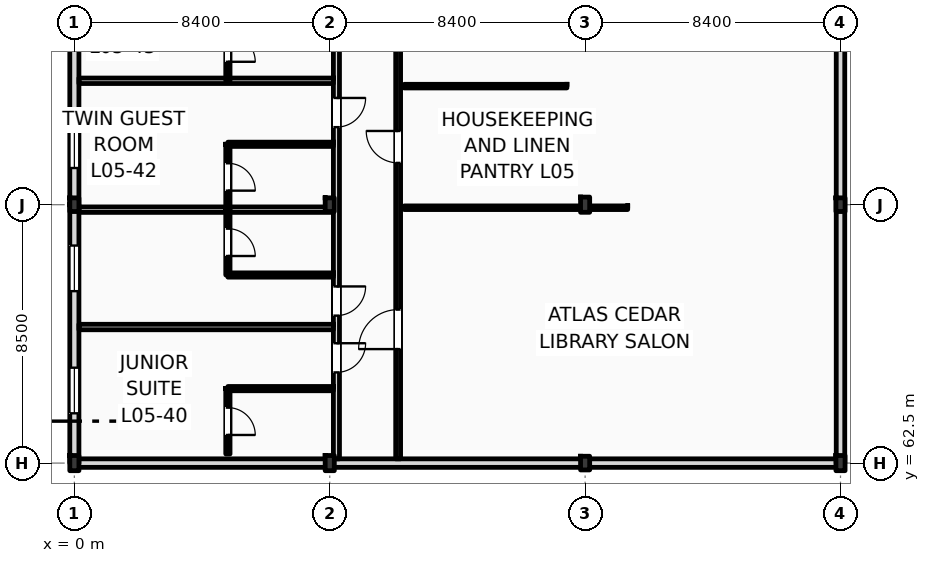
"""IFC4 building model, lengths in metres.
Left out: names, types, materials, properties, quantities, classifications, styles, units other than length and angle.
Written with IfcOpenShell. Run it as: python <this file> out.ifc"""

import sys

from ifc_helpers import new_model, si_unit, direction, frame, frame_2d, origin, origin_2d, place, context, subcontext, project, spatial, rectangle, i_section, extrude, element, fill, save


model = new_model("IFC4")
c1 = context("Model", 3, precision=1e-05, world=origin(), true_north=direction((0.0, 1.0)))
c2 = subcontext(c1, "Body", "Model", "MODEL_VIEW")
j1 = project(units=[si_unit("LENGTHUNIT", "METRE"), si_unit("PLANEANGLEUNIT", "RADIAN")], contexts=[c1])
p1 = place(None, origin())
s1 = spatial("IfcSite", under=j1, at=p1, CompositionType="ELEMENT")
p2 = place(p1, origin())
s2 = spatial("IfcBuilding", under=s1, at=p2, CompositionType="ELEMENT")
p3 = place(p2, frame((0.0, 0.0, 24.6)))
s3 = spatial("IfcBuildingStorey", under=s2, at=p3, CompositionType="ELEMENT", Elevation=24.6)
p4 = place(p3, frame((0.0, 62.5, 0.0), z_axis=(0.0, 0.0, 1.0), x_axis=(1.0, 0.0, 0.0)))
e1 = element("IfcColumn", 1, at=p4, inside=s3, PredefinedType="COLUMN", context=c2, shape_type="SweptSolid", body=[
    extrude(i_section(OverallWidth=0.3, OverallDepth=0.5, WebThickness=0.014, FlangeThickness=0.028, FilletRadius=0.027, at=origin_2d()), origin(), (0.0, 0.0, 1.0), 3.6),
])
p5 = place(p3, frame((0.0, 71.0, 0.0), z_axis=(0.0, 0.0, 1.0), x_axis=(1.0, 0.0, 0.0)))
e2 = element("IfcColumn", 2, at=p5, inside=s3, PredefinedType="COLUMN", context=c2, shape_type="SweptSolid", body=[
    extrude(i_section(OverallWidth=0.3, OverallDepth=0.45, WebThickness=0.014, FlangeThickness=0.026, FilletRadius=0.027, at=origin_2d()), origin(), (0.0, 0.0, 1.0), 3.6),
])
p6 = place(p3, frame((8.4, 62.5, 0.0), z_axis=(0.0, 0.0, 1.0), x_axis=(1.0, 0.0, 0.0)))
e3 = element("IfcColumn", 3, at=p6, inside=s3, PredefinedType="COLUMN", context=c2, shape_type="SweptSolid", body=[
    extrude(i_section(OverallWidth=0.3, OverallDepth=0.5, WebThickness=0.014, FlangeThickness=0.028, FilletRadius=0.027, at=origin_2d()), origin(), (0.0, 0.0, 1.0), 3.6),
])
for number, where, z_axis, x_axis in (
    (4, (8.4, 71.0, 0.0), (0.0, 0.0, 1.0), (1.0, 0.0, 0.0)),
    (5, (16.8, 62.5, 0.0), (0.0, 0.0, 1.0), (1.0, 0.0, 0.0)),
):
    element("IfcColumn", number, at=place(p3, frame(where, z_axis=z_axis, x_axis=x_axis)), inside=s3, PredefinedType="COLUMN", context=c2, shape_type="SweptSolid", body=[
        extrude(i_section(OverallWidth=0.3, OverallDepth=0.45, WebThickness=0.014, FlangeThickness=0.026, FilletRadius=0.027, at=origin_2d()), origin(), (0.0, 0.0, 1.0), 3.6),
    ])
for number, where, z_axis, x_axis in (
    (6, (16.8, 71.0, 0.0), (0.0, 0.0, 1.0), (1.0, 0.0, 0.0)),
    (7, (25.2, 62.5, 0.0), (0.0, 0.0, 1.0), (1.0, 0.0, 0.0)),
):
    element("IfcColumn", number, at=place(p3, frame(where, z_axis=z_axis, x_axis=x_axis)), inside=s3, PredefinedType="COLUMN", context=c2, shape_type="SweptSolid", body=[
        extrude(i_section(OverallWidth=0.3, OverallDepth=0.5, WebThickness=0.014, FlangeThickness=0.028, FilletRadius=0.027, at=origin_2d()), origin(), (0.0, 0.0, 1.0), 3.6),
    ])
p7 = place(p3, frame((25.2, 71.0, 0.0), z_axis=(0.0, 0.0, 1.0), x_axis=(1.0, 0.0, 0.0)))
e8 = element("IfcColumn", 8, at=p7, inside=s3, PredefinedType="COLUMN", context=c2, shape_type="SweptSolid", body=[
    extrude(i_section(OverallWidth=0.3, OverallDepth=0.45, WebThickness=0.014, FlangeThickness=0.026, FilletRadius=0.027, at=origin_2d()), origin(), (0.0, 0.0, 1.0), 3.6),
])
p8 = place(p3, frame((0.0, 62.5, 0.0), z_axis=(0.0, 0.0, 1.0), x_axis=(0.0, 1.0, 0.0)))
e9 = element("IfcWall", 9, at=p8, inside=s3, PredefinedType="STANDARD", context=c2, shape_type="SweptSolid", body=[
    extrude(rectangle(XDim=8.5, YDim=0.3, at=frame_2d((4.25, 0.0))), origin(), (0.0, 0.0, 1.0), 2.93),
])
p9 = place(p8, frame((1.638, 0.0, 0.9)))
e10 = element("IfcOpeningElement", 10, at=p9, cuts=e9, PredefinedType="OPENING", context=c2, shape_type="SweptSolid", body=[
    extrude(rectangle(XDim=1.5, YDim=1.85, at=frame_2d((0.75, 0.925))), frame((0.0, 0.16, 0.0), z_axis=(0.0, -1.0, 0.0), x_axis=(1.0, 0.0, 0.0)), (0.0, 0.0, 1.0), 0.32),
])
p10 = place(p8, frame((5.656, 0.0, 0.9)))
e11 = element("IfcOpeningElement", 11, at=p10, cuts=e9, PredefinedType="OPENING", context=c2, shape_type="SweptSolid", body=[
    extrude(rectangle(XDim=1.5, YDim=1.85, at=frame_2d((0.75, 0.925))), frame((0.0, 0.16, 0.0), z_axis=(0.0, -1.0, 0.0), x_axis=(1.0, 0.0, 0.0)), (0.0, 0.0, 1.0), 0.32),
])
p11 = place(p3, frame((0.0, 71.0, 0.0), z_axis=(0.0, 0.0, 1.0), x_axis=(0.0, 1.0, 0.0)))
e12 = element("IfcWall", 12, at=p11, inside=s3, PredefinedType="STANDARD", context=c2, shape_type="SweptSolid", body=[
    extrude(rectangle(XDim=8.5, YDim=0.3, at=frame_2d((4.25, 0.0))), origin(), (0.0, 0.0, 1.0), 2.93),
])
p12 = place(p11, frame((1.207, 0.0, 0.9)))
e13 = element("IfcOpeningElement", 13, at=p12, cuts=e12, PredefinedType="OPENING", context=c2, shape_type="SweptSolid", body=[
    extrude(rectangle(XDim=1.5, YDim=1.85, at=frame_2d((0.75, 0.925))), frame((0.0, 0.16, 0.0), z_axis=(0.0, -1.0, 0.0), x_axis=(1.0, 0.0, 0.0)), (0.0, 0.0, 1.0), 0.32),
])
p13 = place(p11, frame((5.256, 0.0, 0.9)))
e14 = element("IfcOpeningElement", 14, at=p13, cuts=e12, PredefinedType="OPENING", context=c2, shape_type="SweptSolid", body=[
    extrude(rectangle(XDim=1.5, YDim=1.85, at=frame_2d((0.75, 0.925))), frame((0.0, 0.16, 0.0), z_axis=(0.0, -1.0, 0.0), x_axis=(1.0, 0.0, 0.0)), (0.0, 0.0, 1.0), 0.32),
])
p14 = place(p3, frame((0.0, 62.5, 0.0), z_axis=(0.0, 0.0, 1.0), x_axis=(1.0, 0.0, 0.0)))
e15 = element("IfcWall", 15, at=p14, inside=s3, PredefinedType="STANDARD", context=c2, shape_type="SweptSolid", body=[
    extrude(rectangle(XDim=25.2, YDim=0.28, at=frame_2d((12.6, 0.0))), origin(), (0.0, 0.0, 1.0), 2.78),
])
p15 = place(p3, frame((25.2, 62.5, 0.0), z_axis=(0.0, 0.0, 1.0), x_axis=(0.0, 1.0, 0.0)))
e16 = element("IfcWall", 16, at=p15, inside=s3, PredefinedType="STANDARD", context=c2, shape_type="SweptSolid", body=[
    extrude(rectangle(XDim=17.0, YDim=0.28, at=frame_2d((8.5, 0.0))), origin(), (0.0, 0.0, 1.0), 2.93),
])
p16 = place(p3, frame((8.62, 62.64, 0.0), z_axis=(0.0, 0.0, 1.0), x_axis=(0.0, 1.0, 0.0)))
e17 = element("IfcWall", 17, at=p16, inside=s3, PredefinedType="PARTITIONING", context=c2, shape_type="SweptSolid", body=[
    extrude(rectangle(XDim=32.66, YDim=0.2, at=frame_2d((16.33, 0.0))), origin(), (0.0, 0.0, 1.0), 2.93),
])
p17 = place(p16, frame((2.843, 0.0, 0.0)))
e18 = element("IfcOpeningElement", 18, at=p17, cuts=e17, PredefinedType="OPENING", context=c2, shape_type="SweptSolid", body=[
    extrude(rectangle(XDim=0.96, YDim=2.2, at=frame_2d((0.48, 1.1))), frame((0.0, 0.11, 0.0), z_axis=(0.0, -1.0, 0.0), x_axis=(1.0, 0.0, 0.0)), (0.0, 0.0, 1.0), 0.22),
])
p18 = place(p16, frame((4.711, 0.0, 0.0)))
e19 = element("IfcOpeningElement", 19, at=p18, cuts=e17, PredefinedType="OPENING", context=c2, shape_type="SweptSolid", body=[
    extrude(rectangle(XDim=0.96, YDim=2.2, at=frame_2d((0.48, 1.1))), frame((0.0, 0.11, 0.0), z_axis=(0.0, -1.0, 0.0), x_axis=(1.0, 0.0, 0.0)), (0.0, 0.0, 1.0), 0.22),
])
p19 = place(p16, frame((10.911, 0.0, 0.0)))
e20 = element("IfcOpeningElement", 20, at=p19, cuts=e17, PredefinedType="OPENING", context=c2, shape_type="SweptSolid", body=[
    extrude(rectangle(XDim=0.96, YDim=2.2, at=frame_2d((0.48, 1.1))), frame((0.0, 0.11, 0.0), z_axis=(0.0, -1.0, 0.0), x_axis=(1.0, 0.0, 0.0)), (0.0, 0.0, 1.0), 0.22),
])
p20 = place(p16, frame((14.961, 0.0, 0.0)))
e21 = element("IfcOpeningElement", 21, at=p20, cuts=e17, PredefinedType="OPENING", context=c2, shape_type="SweptSolid", body=[
    extrude(rectangle(XDim=0.96, YDim=2.2, at=frame_2d((0.48, 1.1))), frame((0.0, 0.11, 0.0), z_axis=(0.0, -1.0, 0.0), x_axis=(1.0, 0.0, 0.0)), (0.0, 0.0, 1.0), 0.22),
])
p21 = place(p16, frame((19.012, 0.0, 0.0)))
e22 = element("IfcOpeningElement", 22, at=p21, cuts=e17, PredefinedType="OPENING", context=c2, shape_type="SweptSolid", body=[
    extrude(rectangle(XDim=0.96, YDim=2.2, at=frame_2d((0.48, 1.1))), frame((0.0, 0.11, 0.0), z_axis=(0.0, -1.0, 0.0), x_axis=(1.0, 0.0, 0.0)), (0.0, 0.0, 1.0), 0.22),
])
p22 = place(p16, frame((23.061, 0.0, 0.0)))
e23 = element("IfcOpeningElement", 23, at=p22, cuts=e17, PredefinedType="OPENING", context=c2, shape_type="SweptSolid", body=[
    extrude(rectangle(XDim=0.96, YDim=2.2, at=frame_2d((0.48, 1.1))), frame((0.0, 0.11, 0.0), z_axis=(0.0, -1.0, 0.0), x_axis=(1.0, 0.0, 0.0)), (0.0, 0.0, 1.0), 0.22),
])
p23 = place(p16, frame((27.111, 0.0, 0.0)))
e24 = element("IfcOpeningElement", 24, at=p23, cuts=e17, PredefinedType="OPENING", context=c2, shape_type="SweptSolid", body=[
    extrude(rectangle(XDim=0.96, YDim=2.2, at=frame_2d((0.48, 1.1))), frame((0.0, 0.11, 0.0), z_axis=(0.0, -1.0, 0.0), x_axis=(1.0, 0.0, 0.0)), (0.0, 0.0, 1.0), 0.22),
])
p24 = place(p16, frame((31.193, 0.0, 0.0)))
e25 = element("IfcOpeningElement", 25, at=p24, cuts=e17, PredefinedType="OPENING", context=c2, shape_type="SweptSolid", body=[
    extrude(rectangle(XDim=0.96, YDim=2.2, at=frame_2d((0.48, 1.1))), frame((0.0, 0.11, 0.0), z_axis=(0.0, -1.0, 0.0), x_axis=(1.0, 0.0, 0.0)), (0.0, 0.0, 1.0), 0.22),
])
p25 = place(p3, frame((10.65, 62.64, 0.0), z_axis=(0.0, 0.0, 1.0), x_axis=(0.0, 1.0, 0.0)))
e26 = element("IfcWall", 26, at=p25, inside=s3, PredefinedType="PARTITIONING", context=c2, shape_type="SweptSolid", body=[
    extrude(rectangle(XDim=16.31, YDim=0.16, at=frame_2d((8.155, 0.0))), origin(), (0.0, 0.0, 1.0), 3.34),
])
p26 = place(p25, frame((3.61, 0.0, 0.0)))
e27 = element("IfcOpeningElement", 27, at=p26, cuts=e26, PredefinedType="OPENING", context=c2, shape_type="SweptSolid", body=[
    extrude(rectangle(XDim=1.3, YDim=2.2, at=frame_2d((0.65, 1.1))), frame((0.0, 0.09, 0.0), z_axis=(0.0, -1.0, 0.0), x_axis=(1.0, 0.0, 0.0)), (0.0, 0.0, 1.0), 0.18),
])
p27 = place(p25, frame((9.735, 0.0, 0.0)))
e28 = element("IfcOpeningElement", 28, at=p27, cuts=e26, PredefinedType="OPENING", context=c2, shape_type="SweptSolid", body=[
    extrude(rectangle(XDim=1.05, YDim=2.12, at=frame_2d((0.525, 1.06))), frame((0.0, 0.09, 0.0), z_axis=(0.0, -1.0, 0.0), x_axis=(1.0, 0.0, 0.0)), (0.0, 0.0, 1.0), 0.18),
])
p28 = place(p25, frame((13.49, 0.0, 0.0)))
e29 = element("IfcOpeningElement", 29, at=p28, cuts=e26, PredefinedType="OPENING", context=c2, shape_type="SweptSolid", body=[
    extrude(rectangle(XDim=0.94, YDim=2.15, at=frame_2d((0.47, 1.075))), frame((0.0, 0.09, 0.0), z_axis=(0.0, -1.0, 0.0), x_axis=(1.0, 0.0, 0.0)), (0.0, 0.0, 1.0), 0.18),
])
p29 = place(p3, frame((0.15, 66.976, 0.0), z_axis=(0.0, 0.0, 1.0), x_axis=(1.0, 0.0, 0.0)))
e30 = element("IfcWall", 30, at=p29, inside=s3, PredefinedType="PARTITIONING", context=c2, shape_type="SweptSolid", body=[
    extrude(rectangle(XDim=8.37, YDim=0.18, at=frame_2d((4.185, 0.0))), origin(), (0.0, 0.0, 1.0), 3.34),
])
p30 = place(p3, frame((5.05, 64.95, 0.0), z_axis=(0.0, 0.0, 1.0), x_axis=(1.0, 0.0, 0.0)))
e31 = element("IfcWall", 31, at=p30, inside=s3, PredefinedType="PARTITIONING", context=c2, shape_type="SweptSolid", body=[
    extrude(rectangle(XDim=3.47, YDim=0.14, at=frame_2d((1.735, 0.0))), origin(), (0.0, 0.0, 1.0), 3.34),
])
p31 = place(p3, frame((5.05, 62.8, 0.0), z_axis=(0.0, 0.0, 1.0), x_axis=(0.0, 1.0, 0.0)))
e32 = element("IfcWall", 32, at=p31, inside=s3, PredefinedType="PARTITIONING", context=c2, shape_type="SweptSolid", body=[
    extrude(rectangle(XDim=2.15, YDim=0.14, at=frame_2d((1.075, 0.0))), origin(), (0.0, 0.0, 1.0), 3.34),
])
p32 = place(p31, frame((0.625, 0.0, 0.0)))
e33 = element("IfcOpeningElement", 33, at=p32, cuts=e32, PredefinedType="OPENING", context=c2, shape_type="SweptSolid", body=[
    extrude(rectangle(XDim=0.9, YDim=2.1, at=frame_2d((0.45, 1.05))), frame((0.0, 0.08, 0.0), z_axis=(0.0, -1.0, 0.0), x_axis=(1.0, 0.0, 0.0)), (0.0, 0.0, 1.0), 0.16),
])
p33 = place(p3, frame((0.15, 70.837, 0.0), z_axis=(0.0, 0.0, 1.0), x_axis=(1.0, 0.0, 0.0)))
e34 = element("IfcWall", 34, at=p33, inside=s3, PredefinedType="PARTITIONING", context=c2, shape_type="SweptSolid", body=[
    extrude(rectangle(XDim=8.37, YDim=0.18, at=frame_2d((4.185, 0.0))), origin(), (0.0, 0.0, 1.0), 2.78),
])
p34 = place(p3, frame((5.05, 68.687, 0.0), z_axis=(0.0, 0.0, 1.0), x_axis=(1.0, 0.0, 0.0)))
e35 = element("IfcWall", 35, at=p34, inside=s3, PredefinedType="PARTITIONING", context=c2, shape_type="SweptSolid", body=[
    extrude(rectangle(XDim=3.47, YDim=0.14, at=frame_2d((1.735, 0.0))), origin(), (0.0, 0.0, 1.0), 3.34),
])
p35 = place(p3, frame((5.05, 68.687, 0.0), z_axis=(0.0, 0.0, 1.0), x_axis=(0.0, 1.0, 0.0)))
e36 = element("IfcWall", 36, at=p35, inside=s3, PredefinedType="PARTITIONING", context=c2, shape_type="SweptSolid", body=[
    extrude(rectangle(XDim=2.15, YDim=0.14, at=frame_2d((1.075, 0.0))), origin(), (0.0, 0.0, 1.0), 3.34),
])
p36 = place(p35, frame((0.625, 0.0, 0.0)))
e37 = element("IfcOpeningElement", 37, at=p36, cuts=e36, PredefinedType="OPENING", context=c2, shape_type="SweptSolid", body=[
    extrude(rectangle(XDim=0.9, YDim=2.1, at=frame_2d((0.45, 1.05))), frame((0.0, 0.08, 0.0), z_axis=(0.0, -1.0, 0.0), x_axis=(1.0, 0.0, 0.0)), (0.0, 0.0, 1.0), 0.16),
])
p37 = place(p3, frame((0.15, 75.076, 0.0), z_axis=(0.0, 0.0, 1.0), x_axis=(1.0, 0.0, 0.0)))
e38 = element("IfcWall", 38, at=p37, inside=s3, PredefinedType="PARTITIONING", context=c2, shape_type="SweptSolid", body=[
    extrude(rectangle(XDim=8.37, YDim=0.18, at=frame_2d((4.185, 0.0))), origin(), (0.0, 0.0, 1.0), 3.34),
])
p38 = place(p3, frame((5.05, 72.987, 0.0), z_axis=(0.0, 0.0, 1.0), x_axis=(1.0, 0.0, 0.0)))
e39 = element("IfcWall", 39, at=p38, inside=s3, PredefinedType="PARTITIONING", context=c2, shape_type="SweptSolid", body=[
    extrude(rectangle(XDim=3.47, YDim=0.14, at=frame_2d((1.735, 0.0))), origin(), (0.0, 0.0, 1.0), 3.34),
])
p39 = place(p3, frame((5.05, 70.837, 0.0), z_axis=(0.0, 0.0, 1.0), x_axis=(0.0, 1.0, 0.0)))
e40 = element("IfcWall", 40, at=p39, inside=s3, PredefinedType="PARTITIONING", context=c2, shape_type="SweptSolid", body=[
    extrude(rectangle(XDim=2.15, YDim=0.14, at=frame_2d((1.075, 0.0))), origin(), (0.0, 0.0, 1.0), 3.34),
])
p40 = place(p39, frame((0.625, 0.0, 0.0)))
e41 = element("IfcOpeningElement", 41, at=p40, cuts=e40, PredefinedType="OPENING", context=c2, shape_type="SweptSolid", body=[
    extrude(rectangle(XDim=0.9, YDim=2.1, at=frame_2d((0.45, 1.05))), frame((0.0, 0.08, 0.0), z_axis=(0.0, -1.0, 0.0), x_axis=(1.0, 0.0, 0.0)), (0.0, 0.0, 1.0), 0.16),
])
p41 = place(p3, frame((5.05, 75.076, 0.0), z_axis=(0.0, 0.0, 1.0), x_axis=(0.0, 1.0, 0.0)))
e42 = element("IfcWall", 42, at=p41, inside=s3, PredefinedType="PARTITIONING", context=c2, shape_type="SweptSolid", body=[
    extrude(rectangle(XDim=2.15, YDim=0.14, at=frame_2d((1.075, 0.0))), origin(), (0.0, 0.0, 1.0), 3.34),
])
p42 = place(p41, frame((0.625, 0.0, 0.0)))
e43 = element("IfcOpeningElement", 43, at=p42, cuts=e42, PredefinedType="OPENING", context=c2, shape_type="SweptSolid", body=[
    extrude(rectangle(XDim=0.9, YDim=2.1, at=frame_2d((0.45, 1.05))), frame((0.0, 0.08, 0.0), z_axis=(0.0, -1.0, 0.0), x_axis=(1.0, 0.0, 0.0)), (0.0, 0.0, 1.0), 0.16),
])
p43 = place(p3, frame((10.85, 70.9, 0.0), z_axis=(0.0, 0.0, 1.0), x_axis=(1.0, 0.0, 0.0)))
e44 = element("IfcWall", 44, at=p43, inside=s3, PredefinedType="PARTITIONING", context=c2, shape_type="SweptSolid", body=[
    extrude(rectangle(XDim=7.35, YDim=0.12, at=frame_2d((3.675, 0.0))), origin(), (0.0, 0.0, 1.0), 2.78),
])
p44 = place(p3, frame((10.85, 74.9, 0.0), z_axis=(0.0, 0.0, 1.0), x_axis=(1.0, 0.0, 0.0)))
e45 = element("IfcWall", 45, at=p44, inside=s3, PredefinedType="PARTITIONING", context=c2, shape_type="SweptSolid", body=[
    extrude(rectangle(XDim=5.35, YDim=0.12, at=frame_2d((2.675, 0.0))), origin(), (0.0, 0.0, 1.0), 3.34),
])
p45 = place(p9, origin())
e46 = element("IfcWindow", 46, at=p45, inside=s3, PartitioningType="DOUBLE_PANEL_VERTICAL", PredefinedType="WINDOW", context=c2, shape_type="SweptSolid", body=[
    extrude(rectangle(XDim=1.5, YDim=1.85, at=frame_2d((0.75, 0.925))), frame((0.0, 0.03, 0.0), z_axis=(0.0, -1.0, 0.0), x_axis=(1.0, 0.0, 0.0)), (0.0, 0.0, 1.0), 0.06),
])
fill(e10, e46)
p46 = place(p10, origin())
e47 = element("IfcWindow", 47, at=p46, inside=s3, PartitioningType="DOUBLE_PANEL_VERTICAL", PredefinedType="WINDOW", context=c2, shape_type="SweptSolid", body=[
    extrude(rectangle(XDim=1.5, YDim=1.85, at=frame_2d((0.75, 0.925))), frame((0.0, 0.03, 0.0), z_axis=(0.0, -1.0, 0.0), x_axis=(1.0, 0.0, 0.0)), (0.0, 0.0, 1.0), 0.06),
])
fill(e11, e47)
p47 = place(p12, origin())
e48 = element("IfcWindow", 48, at=p47, inside=s3, PartitioningType="DOUBLE_PANEL_VERTICAL", PredefinedType="WINDOW", context=c2, shape_type="SweptSolid", body=[
    extrude(rectangle(XDim=1.5, YDim=1.85, at=frame_2d((0.75, 0.925))), frame((0.0, 0.03, 0.0), z_axis=(0.0, -1.0, 0.0), x_axis=(1.0, 0.0, 0.0)), (0.0, 0.0, 1.0), 0.06),
])
fill(e13, e48)
p48 = place(p17, frame((0.96, 0.0, 0.0), z_axis=(0.0, 0.0, 1.0), x_axis=(-1.0, 0.0, 0.0)))
e49 = element("IfcDoor", 49, at=p48, inside=s3, OperationType="SINGLE_SWING_RIGHT", PredefinedType="DOOR", context=c2, shape_type="SweptSolid", body=[
    extrude(rectangle(XDim=0.96, YDim=2.2, at=frame_2d((0.48, 1.1))), frame((0.0, 0.025, 0.0), z_axis=(0.0, -1.0, 0.0), x_axis=(1.0, 0.0, 0.0)), (0.0, 0.0, 1.0), 0.05),
])
fill(e18, e49)
p49 = place(p32, frame((0.9, 0.0, 0.0), z_axis=(0.0, 0.0, 1.0), x_axis=(-1.0, 0.0, 0.0)))
e50 = element("IfcDoor", 50, at=p49, inside=s3, OperationType="SINGLE_SWING_LEFT", PredefinedType="DOOR", context=c2, shape_type="SweptSolid", body=[
    extrude(rectangle(XDim=0.9, YDim=2.1, at=frame_2d((0.45, 1.05))), frame((0.0, 0.025, 0.0), z_axis=(0.0, -1.0, 0.0), x_axis=(1.0, 0.0, 0.0)), (0.0, 0.0, 1.0), 0.05),
])
fill(e33, e50)
p50 = place(p18, frame((0.96, 0.0, 0.0), z_axis=(0.0, 0.0, 1.0), x_axis=(-1.0, 0.0, 0.0)))
e51 = element("IfcDoor", 51, at=p50, inside=s3, OperationType="SINGLE_SWING_RIGHT", PredefinedType="DOOR", context=c2, shape_type="SweptSolid", body=[
    extrude(rectangle(XDim=0.96, YDim=2.2, at=frame_2d((0.48, 1.1))), frame((0.0, 0.025, 0.0), z_axis=(0.0, -1.0, 0.0), x_axis=(1.0, 0.0, 0.0)), (0.0, 0.0, 1.0), 0.05),
])
fill(e19, e51)
p51 = place(p36, frame((0.9, 0.0, 0.0), z_axis=(0.0, 0.0, 1.0), x_axis=(-1.0, 0.0, 0.0)))
e52 = element("IfcDoor", 52, at=p51, inside=s3, OperationType="SINGLE_SWING_LEFT", PredefinedType="DOOR", context=c2, shape_type="SweptSolid", body=[
    extrude(rectangle(XDim=0.9, YDim=2.1, at=frame_2d((0.45, 1.05))), frame((0.0, 0.025, 0.0), z_axis=(0.0, -1.0, 0.0), x_axis=(1.0, 0.0, 0.0)), (0.0, 0.0, 1.0), 0.05),
])
fill(e37, e52)
p52 = place(p19, frame((0.96, 0.0, 0.0), z_axis=(0.0, 0.0, 1.0), x_axis=(-1.0, 0.0, 0.0)))
e53 = element("IfcDoor", 53, at=p52, inside=s3, OperationType="SINGLE_SWING_RIGHT", PredefinedType="DOOR", context=c2, shape_type="SweptSolid", body=[
    extrude(rectangle(XDim=0.96, YDim=2.2, at=frame_2d((0.48, 1.1))), frame((0.0, 0.025, 0.0), z_axis=(0.0, -1.0, 0.0), x_axis=(1.0, 0.0, 0.0)), (0.0, 0.0, 1.0), 0.05),
])
fill(e20, e53)
p53 = place(p40, frame((0.9, 0.0, 0.0), z_axis=(0.0, 0.0, 1.0), x_axis=(-1.0, 0.0, 0.0)))
e54 = element("IfcDoor", 54, at=p53, inside=s3, OperationType="SINGLE_SWING_LEFT", PredefinedType="DOOR", context=c2, shape_type="SweptSolid", body=[
    extrude(rectangle(XDim=0.9, YDim=2.1, at=frame_2d((0.45, 1.05))), frame((0.0, 0.025, 0.0), z_axis=(0.0, -1.0, 0.0), x_axis=(1.0, 0.0, 0.0)), (0.0, 0.0, 1.0), 0.05),
])
fill(e41, e54)
p54 = place(p42, frame((0.9, 0.0, 0.0), z_axis=(0.0, 0.0, 1.0), x_axis=(-1.0, 0.0, 0.0)))
e55 = element("IfcDoor", 55, at=p54, inside=s3, OperationType="SINGLE_SWING_LEFT", PredefinedType="DOOR", context=c2, shape_type="SweptSolid", body=[
    extrude(rectangle(XDim=0.9, YDim=2.1, at=frame_2d((0.45, 1.05))), frame((0.0, 0.025, 0.0), z_axis=(0.0, -1.0, 0.0), x_axis=(1.0, 0.0, 0.0)), (0.0, 0.0, 1.0), 0.05),
])
fill(e43, e55)
p55 = place(p26, origin())
e56 = element("IfcDoor", 56, at=p55, inside=s3, OperationType="SINGLE_SWING_LEFT", PredefinedType="DOOR", context=c2, shape_type="SweptSolid", body=[
    extrude(rectangle(XDim=1.3, YDim=2.2, at=frame_2d((0.65, 1.1))), frame((0.0, 0.025, 0.0), z_axis=(0.0, -1.0, 0.0), x_axis=(1.0, 0.0, 0.0)), (0.0, 0.0, 1.0), 0.05),
])
fill(e27, e56)
p56 = place(p27, origin())
e57 = element("IfcDoor", 57, at=p56, inside=s3, OperationType="SINGLE_SWING_RIGHT", PredefinedType="DOOR", context=c2, shape_type="SweptSolid", body=[
    extrude(rectangle(XDim=1.05, YDim=2.12, at=frame_2d((0.525, 1.06))), frame((0.0, 0.025, 0.0), z_axis=(0.0, -1.0, 0.0), x_axis=(1.0, 0.0, 0.0)), (0.0, 0.0, 1.0), 0.05),
])
fill(e28, e57)
save(model, sys.argv[1])
